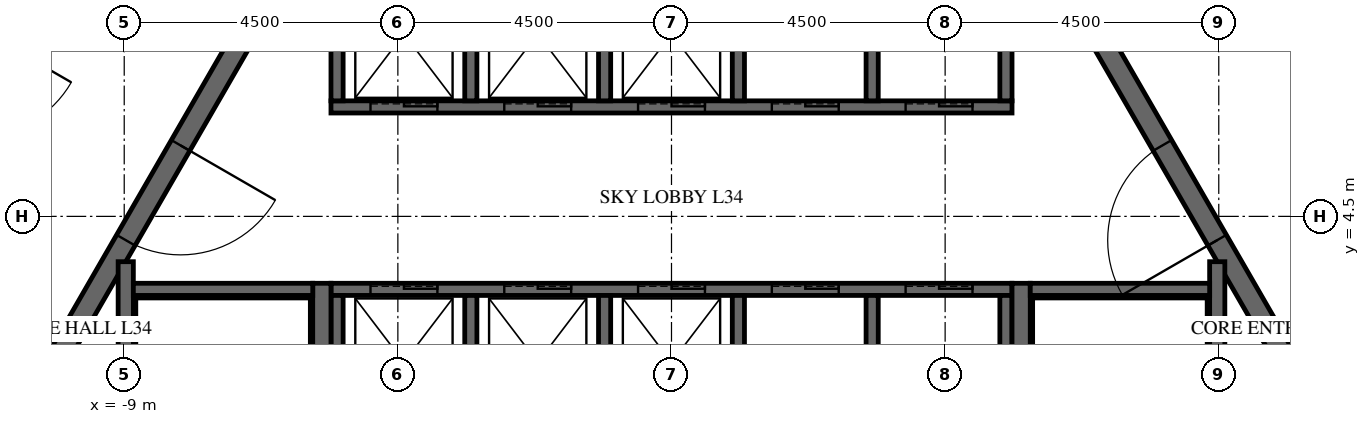
"""IFC4 building model, lengths in metres.
Left out: names, types, materials, properties, quantities, classifications, styles, units other than length and angle.
Written with IfcOpenShell. Run it as: python <this file> out.ifc"""

import sys

from ifc_helpers import new_model, si_unit, direction, frame, frame_2d, origin, place, context, subcontext, project, spatial, polyline, rectangle, outline, extrude, element, fill, save


model = new_model("IFC4")
c1 = context("Model", 3, precision=1e-05, world=origin(), true_north=direction((0.0, 1.0)))
c2 = subcontext(c1, "Body", "Model", "MODEL_VIEW")
j1 = project(units=[si_unit("LENGTHUNIT", "METRE"), si_unit("PLANEANGLEUNIT", "RADIAN")], contexts=[c1])
p1 = place(None, origin())
s1 = spatial("IfcSite", under=j1, at=p1, CompositionType="ELEMENT")
p2 = place(p1, origin())
s2 = spatial("IfcBuilding", under=s1, at=p2, CompositionType="ELEMENT")
p3 = place(p2, frame((0.0, 0.0, 146.7)))
s3 = spatial("IfcBuildingStorey", under=s2, at=p3, CompositionType="ELEMENT", Elevation=146.7)
p4 = place(p3, frame((-7.91, 13.7, -0.3), z_axis=(0.0, 0.0, 1.0), x_axis=(-0.499999880136, -0.866025472988, 0.0)))
e1 = element("IfcWall", 1, at=p4, inside=s3, PredefinedType="SHEAR", context=c2, shape_type="SweptSolid", body=[
    extrude(outline(polyline([(-0.173, -0.3), (15.993, -0.3), (15.646, 0.3), (0.173, 0.3), (-0.173, -0.3)])), origin(), (0.0, 0.0, 1.0), 5.8),
])
p5 = place(p4, frame((7.039, 0.0, 0.3)))
e2 = element("IfcOpeningElement", 2, at=p5, cuts=e1, PredefinedType="OPENING", context=c2, shape_type="SweptSolid", body=[
    extrude(rectangle(XDim=1.8, YDim=2.4, at=frame_2d((0.9, 1.2))), frame((0.0, 0.31, 0.0), z_axis=(0.0, -1.0, 0.0), x_axis=(1.0, 0.0, 0.0)), (0.0, 0.0, 1.0), 0.62),
])
p6 = place(p3, frame((15.819, 0.0, -0.3), z_axis=(0.0, 0.0, 1.0), x_axis=(-0.499999880136, 0.866025472988, 0.0)))
e3 = element("IfcWall", 3, at=p6, inside=s3, PredefinedType="SHEAR", context=c2, shape_type="SweptSolid", body=[
    extrude(outline(polyline([(-0.173, -0.3), (15.993, -0.3), (15.646, 0.3), (0.173, 0.3), (-0.173, -0.3)])), origin(), (0.0, 0.0, 1.0), 5.8),
])
p7 = place(p6, frame((6.981, 0.0, 0.3)))
e4 = element("IfcOpeningElement", 4, at=p7, cuts=e3, PredefinedType="OPENING", context=c2, shape_type="SweptSolid", body=[
    extrude(rectangle(XDim=1.8, YDim=2.4, at=frame_2d((0.9, 1.2))), frame((0.0, 0.31, 0.0), z_axis=(0.0, -1.0, 0.0), x_axis=(1.0, 0.0, 0.0)), (0.0, 0.0, 1.0), 0.62),
])
p8 = place(p3, frame((-5.673, 9.825, -0.3), z_axis=(0.0, 0.0, 1.0), x_axis=(-0.499995046907, -0.866028263435, 0.0)))
e5 = element("IfcWall", 5, at=p8, inside=s3, PredefinedType="SHEAR", context=c2, shape_type="SweptSolid", body=[
    extrude(outline(polyline([(-0.101, -0.175), (11.446, -0.175), (11.244, 0.175), (0.101, 0.175), (-0.101, -0.175)])), origin(), (0.0, 0.0, 1.0), 5.8),
])
p9 = place(p8, frame((4.801, 0.0, 0.3)))
e6 = element("IfcOpeningElement", 6, at=p9, cuts=e5, PredefinedType="OPENING", context=c2, shape_type="SweptSolid", body=[
    extrude(rectangle(XDim=1.8, YDim=2.4, at=frame_2d((0.9, 1.2))), frame((0.0, 0.185, 0.0), z_axis=(0.0, -1.0, 0.0), x_axis=(1.0, 0.0, 0.0)), (0.0, 0.0, 1.0), 0.37),
])
p10 = place(p3, frame((11.345, 0.0, -0.3), z_axis=(0.0, 0.0, 1.0), x_axis=(-0.499995046907, 0.866028263435, 0.0)))
e7 = element("IfcWall", 7, at=p10, inside=s3, PredefinedType="SHEAR", context=c2, shape_type="SweptSolid", body=[
    extrude(outline(polyline([(-0.101, -0.175), (11.446, -0.175), (11.244, 0.175), (0.101, 0.175), (-0.101, -0.175)])), origin(), (0.0, 0.0, 1.0), 5.8),
])
p11 = place(p10, frame((4.744, 0.0, 0.3)))
e8 = element("IfcOpeningElement", 8, at=p11, cuts=e7, PredefinedType="OPENING", context=c2, shape_type="SweptSolid", body=[
    extrude(rectangle(XDim=1.8, YDim=2.4, at=frame_2d((0.9, 1.2))), frame((0.0, 0.185, 0.0), z_axis=(0.0, -1.0, 0.0), x_axis=(1.0, 0.0, 0.0)), (0.0, 0.0, 1.0), 0.37),
])
p12 = place(p3, frame((-5.6, 6.3, -0.25), z_axis=(0.0, 0.0, 1.0), x_axis=(1.0, 0.0, 0.0)))
e9 = element("IfcWall", 9, at=p12, inside=s3, PredefinedType="SHEAR", context=c2, shape_type="SweptSolid", body=[
    extrude(rectangle(XDim=11.2, YDim=0.2, at=frame_2d((5.6, 0.0))), origin(), (0.0, 0.0, 1.0), 5.75),
])
p13 = place(p12, frame((0.65, 0.0, 0.25)))
e10 = element("IfcOpeningElement", 10, at=p13, cuts=e9, PredefinedType="OPENING", context=c2, shape_type="SweptSolid", body=[
    extrude(rectangle(XDim=1.1, YDim=2.1, at=frame_2d((0.55, 1.05))), frame((0.0, 0.11, 0.0), z_axis=(0.0, -1.0, 0.0), x_axis=(1.0, 0.0, 0.0)), (0.0, 0.0, 1.0), 0.22),
])
p14 = place(p12, frame((2.85, 0.0, 0.25)))
e11 = element("IfcOpeningElement", 11, at=p14, cuts=e9, PredefinedType="OPENING", context=c2, shape_type="SweptSolid", body=[
    extrude(rectangle(XDim=1.1, YDim=2.1, at=frame_2d((0.55, 1.05))), frame((0.0, 0.11, 0.0), z_axis=(0.0, -1.0, 0.0), x_axis=(1.0, 0.0, 0.0)), (0.0, 0.0, 1.0), 0.22),
])
p15 = place(p12, frame((5.05, 0.0, 0.25)))
e12 = element("IfcOpeningElement", 12, at=p15, cuts=e9, PredefinedType="OPENING", context=c2, shape_type="SweptSolid", body=[
    extrude(rectangle(XDim=1.1, YDim=2.1, at=frame_2d((0.55, 1.05))), frame((0.0, 0.11, 0.0), z_axis=(0.0, -1.0, 0.0), x_axis=(1.0, 0.0, 0.0)), (0.0, 0.0, 1.0), 0.22),
])
p16 = place(p12, frame((7.25, 0.0, 0.25)))
e13 = element("IfcOpeningElement", 13, at=p16, cuts=e9, PredefinedType="OPENING", context=c2, shape_type="SweptSolid", body=[
    extrude(rectangle(XDim=1.1, YDim=2.1, at=frame_2d((0.55, 1.05))), frame((0.0, 0.11, 0.0), z_axis=(0.0, -1.0, 0.0), x_axis=(1.0, 0.0, 0.0)), (0.0, 0.0, 1.0), 0.22),
])
p17 = place(p12, frame((9.45, 0.0, 0.25)))
e14 = element("IfcOpeningElement", 14, at=p17, cuts=e9, PredefinedType="OPENING", context=c2, shape_type="SweptSolid", body=[
    extrude(rectangle(XDim=1.1, YDim=2.1, at=frame_2d((0.55, 1.05))), frame((0.0, 0.11, 0.0), z_axis=(0.0, -1.0, 0.0), x_axis=(1.0, 0.0, 0.0)), (0.0, 0.0, 1.0), 0.22),
])
for number, where, z_axis, x_axis in (
    (15, (-5.5, 6.4, -0.25), (0.0, 0.0, 1.0), (0.0, 1.0, 0.0)),
    (16, (-3.3, 6.4, -0.25), (0.0, 0.0, 1.0), (0.0, 1.0, 0.0)),
    (17, (-1.1, 6.4, -0.25), (0.0, 0.0, 1.0), (0.0, 1.0, 0.0)),
    (18, (1.1, 6.4, -0.25), (0.0, 0.0, 1.0), (0.0, 1.0, 0.0)),
    (19, (3.3, 6.4, -0.25), (0.0, 0.0, 1.0), (0.0, 1.0, 0.0)),
    (20, (5.5, 6.4, -0.25), (0.0, 0.0, 1.0), (0.0, 1.0, 0.0)),
):
    element("IfcWall", number, at=place(p3, frame(where, z_axis=z_axis, x_axis=x_axis)), inside=s3, PredefinedType="SHEAR", context=c2, shape_type="SweptSolid", body=[
        extrude(rectangle(XDim=2.9, YDim=0.2, at=frame_2d((1.45, 0.0))), origin(), (0.0, 0.0, 1.0), 5.75),
    ])
p18 = place(p3, frame((-5.6, 3.3, -0.25), z_axis=(0.0, 0.0, 1.0), x_axis=(1.0, 0.0, 0.0)))
e21 = element("IfcWall", 21, at=p18, inside=s3, PredefinedType="SHEAR", context=c2, shape_type="SweptSolid", body=[
    extrude(rectangle(XDim=11.2, YDim=0.2, at=frame_2d((5.6, 0.0))), origin(), (0.0, 0.0, 1.0), 5.75),
])
p19 = place(p18, frame((0.65, 0.0, 0.25)))
e22 = element("IfcOpeningElement", 22, at=p19, cuts=e21, PredefinedType="OPENING", context=c2, shape_type="SweptSolid", body=[
    extrude(rectangle(XDim=1.1, YDim=2.1, at=frame_2d((0.55, 1.05))), frame((0.0, 0.11, 0.0), z_axis=(0.0, -1.0, 0.0), x_axis=(1.0, 0.0, 0.0)), (0.0, 0.0, 1.0), 0.22),
])
p20 = place(p18, frame((2.85, 0.0, 0.25)))
e23 = element("IfcOpeningElement", 23, at=p20, cuts=e21, PredefinedType="OPENING", context=c2, shape_type="SweptSolid", body=[
    extrude(rectangle(XDim=1.1, YDim=2.1, at=frame_2d((0.55, 1.05))), frame((0.0, 0.11, 0.0), z_axis=(0.0, -1.0, 0.0), x_axis=(1.0, 0.0, 0.0)), (0.0, 0.0, 1.0), 0.22),
])
p21 = place(p18, frame((5.05, 0.0, 0.25)))
e24 = element("IfcOpeningElement", 24, at=p21, cuts=e21, PredefinedType="OPENING", context=c2, shape_type="SweptSolid", body=[
    extrude(rectangle(XDim=1.1, YDim=2.1, at=frame_2d((0.55, 1.05))), frame((0.0, 0.11, 0.0), z_axis=(0.0, -1.0, 0.0), x_axis=(1.0, 0.0, 0.0)), (0.0, 0.0, 1.0), 0.22),
])
p22 = place(p18, frame((7.25, 0.0, 0.25)))
e25 = element("IfcOpeningElement", 25, at=p22, cuts=e21, PredefinedType="OPENING", context=c2, shape_type="SweptSolid", body=[
    extrude(rectangle(XDim=1.1, YDim=2.1, at=frame_2d((0.55, 1.05))), frame((0.0, 0.11, 0.0), z_axis=(0.0, -1.0, 0.0), x_axis=(1.0, 0.0, 0.0)), (0.0, 0.0, 1.0), 0.22),
])
p23 = place(p18, frame((9.45, 0.0, 0.25)))
e26 = element("IfcOpeningElement", 26, at=p23, cuts=e21, PredefinedType="OPENING", context=c2, shape_type="SweptSolid", body=[
    extrude(rectangle(XDim=1.1, YDim=2.1, at=frame_2d((0.55, 1.05))), frame((0.0, 0.11, 0.0), z_axis=(0.0, -1.0, 0.0), x_axis=(1.0, 0.0, 0.0)), (0.0, 0.0, 1.0), 0.22),
])
for number, where, z_axis, x_axis in (
    (27, (-5.5, 0.1, -0.25), (0.0, 0.0, 1.0), (0.0, 1.0, 0.0)),
    (28, (-3.3, 0.1, -0.25), (0.0, 0.0, 1.0), (0.0, 1.0, 0.0)),
    (29, (-1.1, 0.1, -0.25), (0.0, 0.0, 1.0), (0.0, 1.0, 0.0)),
    (30, (1.1, 0.1, -0.25), (0.0, 0.0, 1.0), (0.0, 1.0, 0.0)),
    (31, (3.3, 0.1, -0.25), (0.0, 0.0, 1.0), (0.0, 1.0, 0.0)),
    (32, (5.5, 0.1, -0.25), (0.0, 0.0, 1.0), (0.0, 1.0, 0.0)),
):
    element("IfcWall", number, at=place(p3, frame(where, z_axis=z_axis, x_axis=x_axis)), inside=s3, PredefinedType="SHEAR", context=c2, shape_type="SweptSolid", body=[
        extrude(rectangle(XDim=3.1, YDim=0.2, at=frame_2d((1.55, 0.0))), origin(), (0.0, 0.0, 1.0), 5.75),
    ])
p24 = place(p3, frame((5.75, -3.4, -0.25), z_axis=(0.0, 0.0, 1.0), x_axis=(0.0, 1.0, 0.0)))
e33 = element("IfcWall", 33, at=p24, inside=s3, PredefinedType="SHEAR", context=c2, shape_type="SweptSolid", body=[
    extrude(rectangle(XDim=6.8, YDim=0.3, at=frame_2d((3.4, 0.0))), origin(), (0.0, 0.0, 1.0), 5.75),
])
p25 = place(p3, frame((8.975, -3.755, -0.25), z_axis=(0.0, 0.0, 1.0), x_axis=(0.0, 1.0, 0.0)))
e34 = element("IfcWall", 34, at=p25, inside=s3, PredefinedType="SHEAR", context=c2, shape_type="SweptSolid", body=[
    extrude(rectangle(XDim=7.51, YDim=0.25, at=frame_2d((3.755, 0.0))), origin(), (0.0, 0.0, 1.0), 5.75),
])
p26 = place(p3, frame((5.9, 3.3, -0.25), z_axis=(0.0, 0.0, 1.0), x_axis=(1.0, 0.0, 0.0)))
e35 = element("IfcWall", 35, at=p26, inside=s3, PredefinedType="SHEAR", context=c2, shape_type="SweptSolid", body=[
    extrude(rectangle(XDim=2.95, YDim=0.2, at=frame_2d((1.475, 0.0))), origin(), (0.0, 0.0, 1.0), 5.75),
])
p27 = place(p3, frame((-5.75, -3.4, -0.25), z_axis=(0.0, 0.0, 1.0), x_axis=(0.0, 1.0, 0.0)))
e36 = element("IfcWall", 36, at=p27, inside=s3, PredefinedType="SHEAR", context=c2, shape_type="SweptSolid", body=[
    extrude(rectangle(XDim=6.8, YDim=0.3, at=frame_2d((3.4, 0.0))), origin(), (0.0, 0.0, 1.0), 5.75),
])
p28 = place(p3, frame((-8.975, -3.755, -0.25), z_axis=(0.0, 0.0, 1.0), x_axis=(0.0, 1.0, 0.0)))
e37 = element("IfcWall", 37, at=p28, inside=s3, PredefinedType="SHEAR", context=c2, shape_type="SweptSolid", body=[
    extrude(rectangle(XDim=7.51, YDim=0.25, at=frame_2d((3.755, 0.0))), origin(), (0.0, 0.0, 1.0), 5.75),
])
p29 = place(p3, frame((-8.85, 3.3, -0.25), z_axis=(0.0, 0.0, 1.0), x_axis=(1.0, 0.0, 0.0)))
e38 = element("IfcWall", 38, at=p29, inside=s3, PredefinedType="SHEAR", context=c2, shape_type="SweptSolid", body=[
    extrude(rectangle(XDim=2.95, YDim=0.2, at=frame_2d((1.475, 0.0))), origin(), (0.0, 0.0, 1.0), 5.75),
])
p30 = place(p9, origin())
e39 = element("IfcDoor", 39, at=p30, inside=s3, OperationType="DOUBLE_DOOR_SINGLE_SWING", PredefinedType="DOOR", context=c2, shape_type="SweptSolid", body=[
    extrude(rectangle(XDim=1.8, YDim=2.4, at=frame_2d((0.9, 1.2))), frame((0.0, 0.025, 0.0), z_axis=(0.0, -1.0, 0.0), x_axis=(1.0, 0.0, 0.0)), (0.0, 0.0, 1.0), 0.05),
])
fill(e6, e39)
p31 = place(p11, origin())
e40 = element("IfcDoor", 40, at=p31, inside=s3, OperationType="DOUBLE_DOOR_SINGLE_SWING", PredefinedType="DOOR", context=c2, shape_type="SweptSolid", body=[
    extrude(rectangle(XDim=1.8, YDim=2.4, at=frame_2d((0.9, 1.2))), frame((0.0, 0.025, 0.0), z_axis=(0.0, -1.0, 0.0), x_axis=(1.0, 0.0, 0.0)), (0.0, 0.0, 1.0), 0.05),
])
fill(e8, e40)
p32 = place(p13, origin())
e41 = element("IfcDoor", 41, at=p32, inside=s3, OperationType="SLIDING_TO_LEFT", PredefinedType="DOOR", context=c2, shape_type="SweptSolid", body=[
    extrude(rectangle(XDim=1.1, YDim=2.1, at=frame_2d((0.55, 1.05))), frame((0.0, 0.025, 0.0), z_axis=(0.0, -1.0, 0.0), x_axis=(1.0, 0.0, 0.0)), (0.0, 0.0, 1.0), 0.05),
])
fill(e10, e41)
p33 = place(p14, origin())
e42 = element("IfcDoor", 42, at=p33, inside=s3, OperationType="SLIDING_TO_LEFT", PredefinedType="DOOR", context=c2, shape_type="SweptSolid", body=[
    extrude(rectangle(XDim=1.1, YDim=2.1, at=frame_2d((0.55, 1.05))), frame((0.0, 0.025, 0.0), z_axis=(0.0, -1.0, 0.0), x_axis=(1.0, 0.0, 0.0)), (0.0, 0.0, 1.0), 0.05),
])
fill(e11, e42)
p34 = place(p15, origin())
e43 = element("IfcDoor", 43, at=p34, inside=s3, OperationType="SLIDING_TO_LEFT", PredefinedType="DOOR", context=c2, shape_type="SweptSolid", body=[
    extrude(rectangle(XDim=1.1, YDim=2.1, at=frame_2d((0.55, 1.05))), frame((0.0, 0.025, 0.0), z_axis=(0.0, -1.0, 0.0), x_axis=(1.0, 0.0, 0.0)), (0.0, 0.0, 1.0), 0.05),
])
fill(e12, e43)
p35 = place(p16, origin())
e44 = element("IfcDoor", 44, at=p35, inside=s3, OperationType="SLIDING_TO_LEFT", PredefinedType="DOOR", context=c2, shape_type="SweptSolid", body=[
    extrude(rectangle(XDim=1.1, YDim=2.1, at=frame_2d((0.55, 1.05))), frame((0.0, 0.025, 0.0), z_axis=(0.0, -1.0, 0.0), x_axis=(1.0, 0.0, 0.0)), (0.0, 0.0, 1.0), 0.05),
])
fill(e13, e44)
p36 = place(p17, origin())
e45 = element("IfcDoor", 45, at=p36, inside=s3, OperationType="SLIDING_TO_LEFT", PredefinedType="DOOR", context=c2, shape_type="SweptSolid", body=[
    extrude(rectangle(XDim=1.1, YDim=2.1, at=frame_2d((0.55, 1.05))), frame((0.0, 0.025, 0.0), z_axis=(0.0, -1.0, 0.0), x_axis=(1.0, 0.0, 0.0)), (0.0, 0.0, 1.0), 0.05),
])
fill(e14, e45)
p37 = place(p19, origin())
e46 = element("IfcDoor", 46, at=p37, inside=s3, OperationType="SLIDING_TO_LEFT", PredefinedType="DOOR", context=c2, shape_type="SweptSolid", body=[
    extrude(rectangle(XDim=1.1, YDim=2.1, at=frame_2d((0.55, 1.05))), frame((0.0, 0.025, 0.0), z_axis=(0.0, -1.0, 0.0), x_axis=(1.0, 0.0, 0.0)), (0.0, 0.0, 1.0), 0.05),
])
fill(e22, e46)
p38 = place(p20, origin())
e47 = element("IfcDoor", 47, at=p38, inside=s3, OperationType="SLIDING_TO_LEFT", PredefinedType="DOOR", context=c2, shape_type="SweptSolid", body=[
    extrude(rectangle(XDim=1.1, YDim=2.1, at=frame_2d((0.55, 1.05))), frame((0.0, 0.025, 0.0), z_axis=(0.0, -1.0, 0.0), x_axis=(1.0, 0.0, 0.0)), (0.0, 0.0, 1.0), 0.05),
])
fill(e23, e47)
p39 = place(p21, origin())
e48 = element("IfcDoor", 48, at=p39, inside=s3, OperationType="SLIDING_TO_LEFT", PredefinedType="DOOR", context=c2, shape_type="SweptSolid", body=[
    extrude(rectangle(XDim=1.1, YDim=2.1, at=frame_2d((0.55, 1.05))), frame((0.0, 0.025, 0.0), z_axis=(0.0, -1.0, 0.0), x_axis=(1.0, 0.0, 0.0)), (0.0, 0.0, 1.0), 0.05),
])
fill(e24, e48)
p40 = place(p22, origin())
e49 = element("IfcDoor", 49, at=p40, inside=s3, OperationType="SLIDING_TO_LEFT", PredefinedType="DOOR", context=c2, shape_type="SweptSolid", body=[
    extrude(rectangle(XDim=1.1, YDim=2.1, at=frame_2d((0.55, 1.05))), frame((0.0, 0.025, 0.0), z_axis=(0.0, -1.0, 0.0), x_axis=(1.0, 0.0, 0.0)), (0.0, 0.0, 1.0), 0.05),
])
fill(e25, e49)
p41 = place(p23, origin())
e50 = element("IfcDoor", 50, at=p41, inside=s3, OperationType="SLIDING_TO_LEFT", PredefinedType="DOOR", context=c2, shape_type="SweptSolid", body=[
    extrude(rectangle(XDim=1.1, YDim=2.1, at=frame_2d((0.55, 1.05))), frame((0.0, 0.025, 0.0), z_axis=(0.0, -1.0, 0.0), x_axis=(1.0, 0.0, 0.0)), (0.0, 0.0, 1.0), 0.05),
])
fill(e26, e50)
save(model, sys.argv[1])
